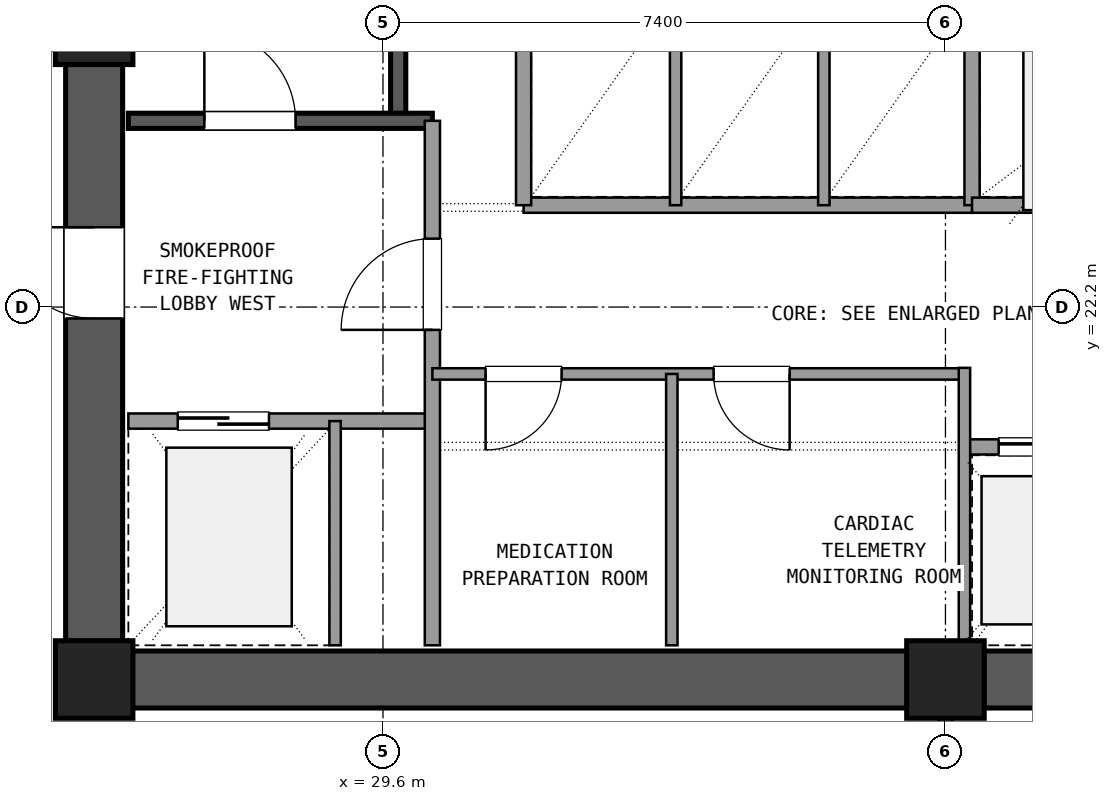
"""IFC4 building model, lengths in metres.
Left out: names, types, materials, properties, quantities, classifications, styles, units other than length and angle.
Written with IfcOpenShell. Run it as: python <this file> out.ifc"""

import sys

from ifc_helpers import new_model, si_unit, direction, frame, frame_2d, origin, origin_2d, place, context, subcontext, project, spatial, rectangle, extrude, element, fill, save


model = new_model("IFC4")
c1 = context("Model", 3, precision=1e-05, world=origin(), true_north=direction((0.0, 1.0)))
c2 = subcontext(c1, "Body", "Model", "MODEL_VIEW")
j1 = project(units=[si_unit("LENGTHUNIT", "METRE"), si_unit("PLANEANGLEUNIT", "RADIAN")], contexts=[c1])
p1 = place(None, origin())
s1 = spatial("IfcSite", under=j1, at=p1, CompositionType="ELEMENT")
p2 = place(p1, origin())
s2 = spatial("IfcBuilding", under=s1, at=p2, CompositionType="ELEMENT")
p3 = place(p2, frame((0.0, 0.0, 99.18)))
s3 = spatial("IfcBuildingStorey", under=s2, at=p3, CompositionType="ELEMENT", Elevation=99.18)
for number, where, z_axis, x_axis in (
    (1, (25.8, 17.3, 0.0), (0.0, 0.0, 1.0), (1.0, 0.0, 0.0)),
    (2, (37.0, 17.3, 0.0), (0.0, 0.0, 1.0), (1.0, 0.0, 0.0)),
    (3, (25.8, 25.9, 0.0), (0.0, 0.0, 1.0), (1.0, 0.0, 0.0)),
):
    element("IfcColumn", number, at=place(p3, frame(where, z_axis=z_axis, x_axis=x_axis)), inside=s3, PredefinedType="COLUMN", context=c2, shape_type="SweptSolid", body=[
        extrude(rectangle(XDim=1.02, YDim=1.02, at=origin_2d()), origin(), (0.0, 0.0, 1.0), 3.6),
    ])
for number, where, z_axis, x_axis in (
    (4, (26.305, 17.3, 0.0), (0.0, 0.0, 1.0), (1.0, 0.0, 0.0)),
    (5, (37.505, 17.3, 0.0), (0.0, 0.0, 1.0), (1.0, 0.0, 0.0)),
):
    element("IfcWall", number, at=place(p3, frame(where, z_axis=z_axis, x_axis=x_axis)), inside=s3, PredefinedType="SHEAR", context=c2, shape_type="SweptSolid", body=[
        extrude(rectangle(XDim=10.19, YDim=0.75, at=frame_2d((5.095, 0.0))), origin(), (0.0, 0.0, 1.0), 3.32),
    ])
p4 = place(p3, frame((25.8, 25.395, 0.0), z_axis=(0.0, 0.0, 1.0), x_axis=(0.0, -1.0, 0.0)))
e6 = element("IfcWall", 6, at=p4, inside=s3, PredefinedType="SHEAR", context=c2, shape_type="SweptSolid", body=[
    extrude(rectangle(XDim=7.59, YDim=0.75, at=frame_2d((3.795, 0.0))), origin(), (0.0, 0.0, 1.0), 3.32),
])
p5 = place(p4, frame((2.145, 0.0, 0.0)))
e7 = element("IfcOpeningElement", 7, at=p5, cuts=e6, PredefinedType="OPENING", context=c2, shape_type="SweptSolid", body=[
    extrude(rectangle(XDim=1.2, YDim=2.15, at=frame_2d((0.6, 1.075))), frame((0.0, 0.385, 0.0), z_axis=(0.0, -1.0, 0.0), x_axis=(1.0, 0.0, 0.0)), (0.0, 0.0, 1.0), 0.77),
])
p6 = place(p3, frame((29.8, 24.65, 0.0), z_axis=(0.0, 0.0, 1.0), x_axis=(0.0, 1.0, 0.0)))
e8 = element("IfcWall", 8, at=p6, inside=s3, PredefinedType="SHEAR", context=c2, shape_type="SweptSolid", body=[
    extrude(rectangle(XDim=9.4, YDim=0.2, at=frame_2d((4.7, 0.0))), origin(), (0.0, 0.0, 1.0), 3.32),
])
p7 = place(p3, frame((26.25, 24.65, 0.0), z_axis=(0.0, 0.0, 1.0), x_axis=(1.0, 0.0, 0.0)))
e9 = element("IfcWall", 9, at=p7, inside=s3, PredefinedType="SHEAR", context=c2, shape_type="SweptSolid", body=[
    extrude(rectangle(XDim=4.0, YDim=0.2, at=frame_2d((2.0, 0.0))), origin(), (0.0, 0.0, 1.0), 3.32),
])
p8 = place(p7, frame((1.0, 0.0, 0.0)))
e10 = element("IfcOpeningElement", 10, at=p8, cuts=e9, PredefinedType="OPENING", context=c2, shape_type="SweptSolid", body=[
    extrude(rectangle(XDim=1.2, YDim=2.15, at=frame_2d((0.6, 1.075))), frame((0.0, 0.11, 0.0), z_axis=(0.0, -1.0, 0.0), x_axis=(1.0, 0.0, 0.0)), (0.0, 0.0, 1.0), 0.22),
])
p9 = place(p3, frame((26.25, 20.7, 0.0), z_axis=(0.0, 0.0, 1.0), x_axis=(1.0, 0.0, 0.0)))
e11 = element("IfcWall", 11, at=p9, inside=s3, PredefinedType="SOLIDWALL", context=c2, shape_type="SweptSolid", body=[
    extrude(rectangle(XDim=4.0, YDim=0.2, at=frame_2d((2.0, 0.0))), origin(), (0.0, 0.0, 1.0), 2.61),
])
p10 = place(p9, frame((0.65, 0.0, 0.0)))
e12 = element("IfcOpeningElement", 12, at=p10, cuts=e11, PredefinedType="OPENING", context=c2, shape_type="SweptSolid", body=[
    extrude(rectangle(XDim=1.2, YDim=2.15, at=frame_2d((0.6, 1.075))), frame((0.0, 0.11, 0.0), z_axis=(0.0, -1.0, 0.0), x_axis=(1.0, 0.0, 0.0)), (0.0, 0.0, 1.0), 0.22),
])
p11 = place(p3, frame((30.25, 17.75, 0.0), z_axis=(0.0, 0.0, 1.0), x_axis=(0.0, 1.0, 0.0)))
e13 = element("IfcWall", 13, at=p11, inside=s3, PredefinedType="SOLIDWALL", context=c2, shape_type="SweptSolid", body=[
    extrude(rectangle(XDim=6.9, YDim=0.2, at=frame_2d((3.45, 0.0))), origin(), (0.0, 0.0, 1.0), 2.61),
])
p12 = place(p11, frame((4.15, 0.0, 0.0)))
e14 = element("IfcOpeningElement", 14, at=p12, cuts=e13, PredefinedType="OPENING", context=c2, shape_type="SweptSolid", body=[
    extrude(rectangle(XDim=1.2, YDim=2.15, at=frame_2d((0.6, 1.075))), frame((0.0, 0.11, 0.0), z_axis=(0.0, -1.0, 0.0), x_axis=(1.0, 0.0, 0.0)), (0.0, 0.0, 1.0), 0.22),
])
p13 = place(p3, frame((28.97, 17.75, 0.0), z_axis=(0.0, 0.0, 1.0), x_axis=(0.0, 1.0, 0.0)))
e15 = element("IfcWall", 15, at=p13, inside=s3, PredefinedType="PARTITIONING", context=c2, shape_type="SweptSolid", body=[
    extrude(rectangle(XDim=2.95, YDim=0.15, at=frame_2d((1.475, 0.0))), origin(), (0.0, 0.0, 1.0), 2.61),
])
p14 = place(p3, frame((30.25, 21.32, 0.0), z_axis=(0.0, 0.0, 1.0), x_axis=(1.0, 0.0, 0.0)))
e16 = element("IfcWall", 16, at=p14, inside=s3, PredefinedType="PARTITIONING", context=c2, shape_type="SweptSolid", body=[
    extrude(rectangle(XDim=7.0, YDim=0.15, at=frame_2d((3.5, 0.0))), origin(), (0.0, 0.0, 1.0), 2.61),
])
p15 = place(p14, frame((0.7, 0.0, 0.0)))
e17 = element("IfcOpeningElement", 17, at=p15, cuts=e16, PredefinedType="OPENING", context=c2, shape_type="SweptSolid", body=[
    extrude(rectangle(XDim=1.0, YDim=2.15, at=frame_2d((0.5, 1.075))), frame((0.0, 0.085, 0.0), z_axis=(0.0, -1.0, 0.0), x_axis=(1.0, 0.0, 0.0)), (0.0, 0.0, 1.0), 0.17),
])
p16 = place(p14, frame((3.7, 0.0, 0.0)))
e18 = element("IfcOpeningElement", 18, at=p16, cuts=e16, PredefinedType="OPENING", context=c2, shape_type="SweptSolid", body=[
    extrude(rectangle(XDim=1.0, YDim=2.15, at=frame_2d((0.5, 1.075))), frame((0.0, 0.085, 0.0), z_axis=(0.0, -1.0, 0.0), x_axis=(1.0, 0.0, 0.0)), (0.0, 0.0, 1.0), 0.17),
])
p17 = place(p3, frame((33.4, 17.75, 0.0), z_axis=(0.0, 0.0, 1.0), x_axis=(0.0, 1.0, 0.0)))
e19 = element("IfcWall", 19, at=p17, inside=s3, PredefinedType="PARTITIONING", context=c2, shape_type="SweptSolid", body=[
    extrude(rectangle(XDim=3.57, YDim=0.15, at=frame_2d((1.785, 0.0))), origin(), (0.0, 0.0, 1.0), 2.61),
])
p18 = place(p3, frame((37.25, 20.36, 0.0), z_axis=(0.0, 0.0, 1.0), x_axis=(1.0, 0.0, 0.0)))
e20 = element("IfcWall", 20, at=p18, inside=s3, PredefinedType="SOLIDWALL", context=c2, shape_type="SweptSolid", body=[
    extrude(rectangle(XDim=6.1, YDim=0.2, at=frame_2d((3.05, 0.0))), origin(), (0.0, 0.0, 1.0), 2.61),
])
p19 = place(p18, frame((0.45, 0.0, 0.0)))
e21 = element("IfcOpeningElement", 21, at=p19, cuts=e20, PredefinedType="OPENING", context=c2, shape_type="SweptSolid", body=[
    extrude(rectangle(XDim=1.1, YDim=2.15, at=frame_2d((0.55, 1.075))), frame((0.0, 0.11, 0.0), z_axis=(0.0, -1.0, 0.0), x_axis=(1.0, 0.0, 0.0)), (0.0, 0.0, 1.0), 0.22),
])
p20 = place(p18, frame((2.5, 0.0, 0.0)))
e22 = element("IfcOpeningElement", 22, at=p20, cuts=e20, PredefinedType="OPENING", context=c2, shape_type="SweptSolid", body=[
    extrude(rectangle(XDim=1.1, YDim=2.15, at=frame_2d((0.55, 1.075))), frame((0.0, 0.11, 0.0), z_axis=(0.0, -1.0, 0.0), x_axis=(1.0, 0.0, 0.0)), (0.0, 0.0, 1.0), 0.22),
])
p21 = place(p18, frame((4.55, 0.0, 0.0)))
e23 = element("IfcOpeningElement", 23, at=p21, cuts=e20, PredefinedType="OPENING", context=c2, shape_type="SweptSolid", body=[
    extrude(rectangle(XDim=1.1, YDim=2.15, at=frame_2d((0.55, 1.075))), frame((0.0, 0.11, 0.0), z_axis=(0.0, -1.0, 0.0), x_axis=(1.0, 0.0, 0.0)), (0.0, 0.0, 1.0), 0.22),
])
p22 = place(p3, frame((37.25, 17.75, 0.0), z_axis=(0.0, 0.0, 1.0), x_axis=(0.0, 1.0, 0.0)))
e24 = element("IfcWall", 24, at=p22, inside=s3, PredefinedType="PARTITIONING", context=c2, shape_type="SweptSolid", body=[
    extrude(rectangle(XDim=3.65, YDim=0.15, at=frame_2d((1.825, 0.0))), origin(), (0.0, 0.0, 1.0), 2.61),
])
p23 = place(p3, frame((31.45, 23.54, 0.0), z_axis=(0.0, 0.0, 1.0), x_axis=(1.0, 0.0, 0.0)))
e25 = element("IfcWall", 25, at=p23, inside=s3, PredefinedType="SOLIDWALL", context=c2, shape_type="SweptSolid", body=[
    extrude(rectangle(XDim=5.9, YDim=0.2, at=frame_2d((2.95, 0.0))), origin(), (0.0, 0.0, 1.0), 2.61),
])
p24 = place(p3, frame((31.45, 23.54, 0.0), z_axis=(0.0, 0.0, 1.0), x_axis=(0.0, 1.0, 0.0)))
e26 = element("IfcWall", 26, at=p24, inside=s3, PredefinedType="SOLIDWALL", context=c2, shape_type="SweptSolid", body=[
    extrude(rectangle(XDim=2.81, YDim=0.2, at=frame_2d((1.405, 0.0))), origin(), (0.0, 0.0, 1.0), 2.61),
])
for number, where, z_axis, x_axis in (
    (27, (33.45, 23.54, 0.0), (0.0, 0.0, 1.0), (0.0, 1.0, 0.0)),
    (28, (35.4, 23.54, 0.0), (0.0, 0.0, 1.0), (0.0, 1.0, 0.0)),
):
    element("IfcWall", number, at=place(p3, frame(where, z_axis=z_axis, x_axis=x_axis)), inside=s3, PredefinedType="PARTITIONING", context=c2, shape_type="SweptSolid", body=[
        extrude(rectangle(XDim=2.81, YDim=0.15, at=frame_2d((1.405, 0.0))), origin(), (0.0, 0.0, 1.0), 2.61),
    ])
p25 = place(p3, frame((37.35, 23.54, 0.0), z_axis=(0.0, 0.0, 1.0), x_axis=(0.0, 1.0, 0.0)))
e29 = element("IfcWall", 29, at=p25, inside=s3, PredefinedType="SOLIDWALL", context=c2, shape_type="SweptSolid", body=[
    extrude(rectangle(XDim=6.82, YDim=0.2, at=frame_2d((3.41, 0.0))), origin(), (0.0, 0.0, 1.0), 2.61),
])
p26 = place(p3, frame((37.35, 23.54, 0.0), z_axis=(0.0, 0.0, 1.0), x_axis=(1.0, 0.0, 0.0)))
e30 = element("IfcWall", 30, at=p26, inside=s3, PredefinedType="SOLIDWALL", context=c2, shape_type="SweptSolid", body=[
    extrude(rectangle(XDim=3.05, YDim=0.2, at=frame_2d((1.525, 0.0))), origin(), (0.0, 0.0, 1.0), 2.61),
])
p27 = place(p3, frame((37.0, 13.64, 0.0), z_axis=(0.0, 0.0, 1.0), x_axis=(0.0, 1.0, 0.0)))
e31 = element("IfcWall", 31, at=p27, inside=s3, PredefinedType="PARTITIONING", context=c2, shape_type="SweptSolid", body=[
    extrude(rectangle(XDim=3.21, YDim=0.18, at=frame_2d((1.605, 0.0))), origin(), (0.0, 0.0, 1.0), 2.61),
])
p28 = place(p27, frame((0.605, 0.0, 0.0)))
e32 = element("IfcOpeningElement", 32, at=p28, cuts=e31, PredefinedType="OPENING", context=c2, shape_type="SweptSolid", body=[
    extrude(rectangle(XDim=2.0, YDim=2.2, at=frame_2d((1.0, 1.1))), frame((0.0, 0.1, 0.0), z_axis=(0.0, -1.0, 0.0), x_axis=(1.0, 0.0, 0.0)), (0.0, 0.0, 1.0), 0.2),
])
p29 = place(p8, origin())
e33 = element("IfcDoor", 33, at=p29, inside=s3, OperationType="SINGLE_SWING_LEFT", PredefinedType="DOOR", context=c2, shape_type="SweptSolid", body=[
    extrude(rectangle(XDim=1.2, YDim=2.15, at=frame_2d((0.6, 1.075))), frame((0.0, 0.025, 0.0), z_axis=(0.0, -1.0, 0.0), x_axis=(1.0, 0.0, 0.0)), (0.0, 0.0, 1.0), 0.05),
])
fill(e10, e33)
p30 = place(p10, origin())
e34 = element("IfcDoor", 34, at=p30, inside=s3, OperationType="SLIDING_TO_LEFT", PredefinedType="DOOR", context=c2, shape_type="SweptSolid", body=[
    extrude(rectangle(XDim=1.2, YDim=2.15, at=frame_2d((0.6, 1.075))), frame((0.0, 0.025, 0.0), z_axis=(0.0, -1.0, 0.0), x_axis=(1.0, 0.0, 0.0)), (0.0, 0.0, 1.0), 0.05),
])
fill(e12, e34)
p31 = place(p12, origin())
e35 = element("IfcDoor", 35, at=p31, inside=s3, OperationType="SINGLE_SWING_LEFT", PredefinedType="DOOR", context=c2, shape_type="SweptSolid", body=[
    extrude(rectangle(XDim=1.2, YDim=2.15, at=frame_2d((0.6, 1.075))), frame((0.0, 0.025, 0.0), z_axis=(0.0, -1.0, 0.0), x_axis=(1.0, 0.0, 0.0)), (0.0, 0.0, 1.0), 0.05),
])
fill(e14, e35)
p32 = place(p5, frame((1.2, 0.0, 0.0), z_axis=(0.0, 0.0, 1.0), x_axis=(-1.0, 0.0, 0.0)))
e36 = element("IfcDoor", 36, at=p32, inside=s3, OperationType="SINGLE_SWING_LEFT", PredefinedType="DOOR", context=c2, shape_type="SweptSolid", body=[
    extrude(rectangle(XDim=1.2, YDim=2.15, at=frame_2d((0.6, 1.075))), frame((0.0, 0.025, 0.0), z_axis=(0.0, -1.0, 0.0), x_axis=(1.0, 0.0, 0.0)), (0.0, 0.0, 1.0), 0.05),
])
fill(e7, e36)
p33 = place(p15, frame((1.0, 0.0, 0.0), z_axis=(0.0, 0.0, 1.0), x_axis=(-1.0, 0.0, 0.0)))
e37 = element("IfcDoor", 37, at=p33, inside=s3, OperationType="SINGLE_SWING_LEFT", PredefinedType="DOOR", context=c2, shape_type="SweptSolid", body=[
    extrude(rectangle(XDim=1.0, YDim=2.15, at=frame_2d((0.5, 1.075))), frame((0.0, 0.025, 0.0), z_axis=(0.0, -1.0, 0.0), x_axis=(1.0, 0.0, 0.0)), (0.0, 0.0, 1.0), 0.05),
])
fill(e17, e37)
p34 = place(p16, frame((1.0, 0.0, 0.0), z_axis=(0.0, 0.0, 1.0), x_axis=(-1.0, 0.0, 0.0)))
e38 = element("IfcDoor", 38, at=p34, inside=s3, OperationType="SINGLE_SWING_RIGHT", PredefinedType="DOOR", context=c2, shape_type="SweptSolid", body=[
    extrude(rectangle(XDim=1.0, YDim=2.15, at=frame_2d((0.5, 1.075))), frame((0.0, 0.025, 0.0), z_axis=(0.0, -1.0, 0.0), x_axis=(1.0, 0.0, 0.0)), (0.0, 0.0, 1.0), 0.05),
])
fill(e18, e38)
p35 = place(p19, origin())
e39 = element("IfcDoor", 39, at=p35, inside=s3, OperationType="SLIDING_TO_LEFT", PredefinedType="DOOR", context=c2, shape_type="SweptSolid", body=[
    extrude(rectangle(XDim=1.1, YDim=2.15, at=frame_2d((0.55, 1.075))), frame((0.0, 0.025, 0.0), z_axis=(0.0, -1.0, 0.0), x_axis=(1.0, 0.0, 0.0)), (0.0, 0.0, 1.0), 0.05),
])
fill(e21, e39)
save(model, sys.argv[1])
